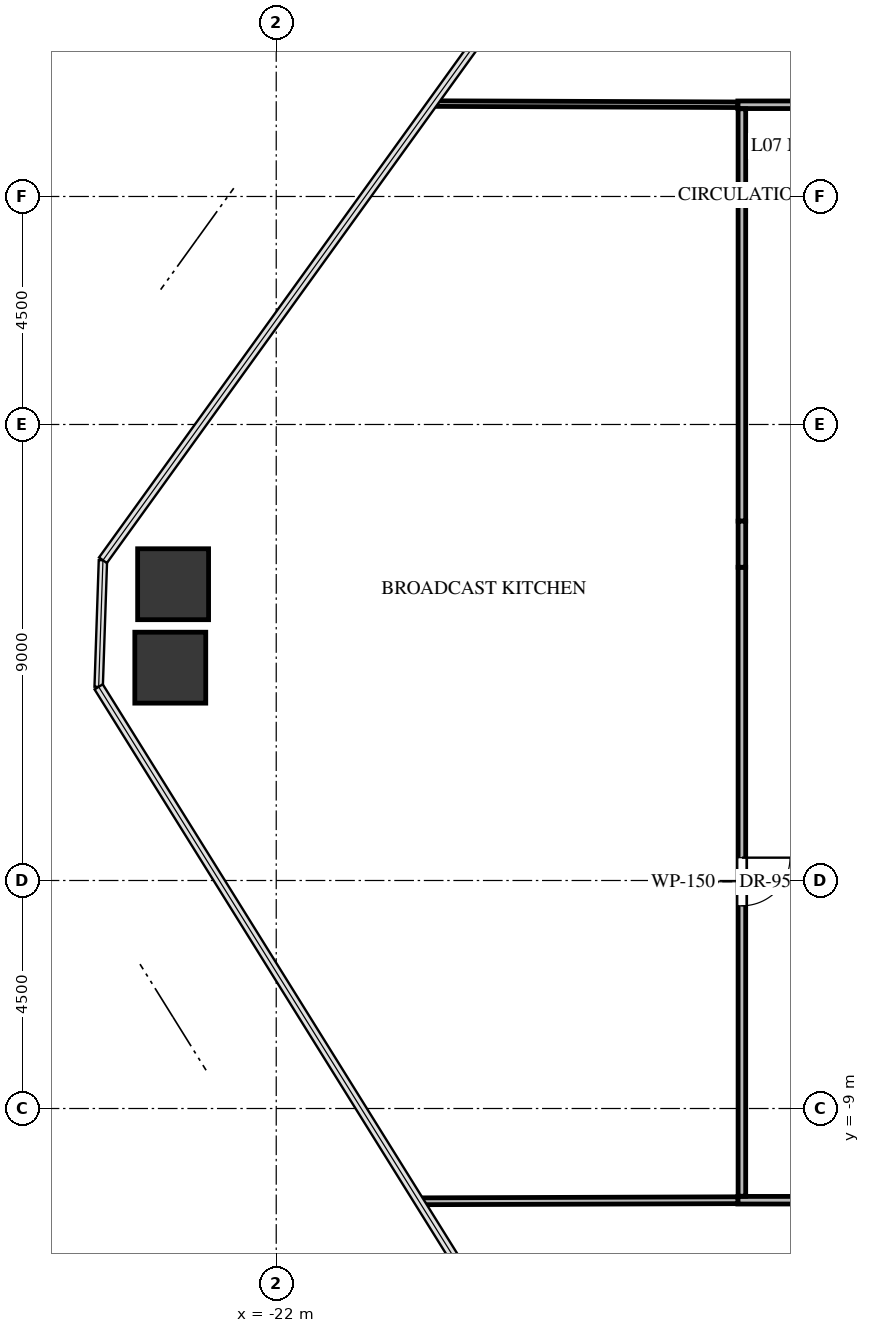
"""IFC4 building model, lengths in metres.
Left out: names, types, materials, properties, quantities, classifications, styles, units other than length and angle.
Written with IfcOpenShell. Run it as: python <this file> out.ifc"""

import sys

from ifc_helpers import new_model, si_unit, direction, frame, frame_2d, origin, origin_2d, place, context, subcontext, project, spatial, rectangle, extrude, source, transform, mapped, element, fill, save


model = new_model("IFC4")
c1 = context("Model", 3, precision=1e-05, world=origin(), true_north=direction((0.0, 1.0)))
c2 = subcontext(c1, "Body", "Model", "MODEL_VIEW")
j1 = project(units=[si_unit("LENGTHUNIT", "METRE"), si_unit("PLANEANGLEUNIT", "RADIAN")], contexts=[c1])
p1 = place(None, origin())
s1 = spatial("IfcSite", under=j1, at=p1, CompositionType="ELEMENT")
p2 = place(p1, origin())
s2 = spatial("IfcBuilding", under=s1, at=p2, CompositionType="ELEMENT")
p3 = place(p2, frame((0.0, 0.0, 35.7)))
s3 = spatial("IfcBuildingStorey", under=s2, at=p3, CompositionType="ELEMENT", Elevation=35.7)
m1 = source(origin(), c2, "Body", "SweptSolid", [
    extrude(rectangle(XDim=1.4, YDim=1.4, at=origin_2d()), origin(), (0.0, 0.0, 1.0), 3.3),
])
for number, where, z_axis, x_axis in (
    (1, (-24.091, -0.3, -0.24), (0.0, 0.0, 1.0), (1.0, 0.0, 0.0)),
    (2, (-24.035, 1.347, -0.24), (0.0, 0.0, 1.0), (1.0, 0.0, 0.0)),
):
    element("IfcColumn", number, at=place(p3, frame(where, z_axis=z_axis, x_axis=x_axis)), inside=s3, PredefinedType="COLUMN", context=c2, shape_type="MappedRepresentation", body=[
        mapped(m1, transform((0.0, 0.0, 0.0), x_axis=(1.0, 0.0, 0.0), y_axis=(0.0, 1.0, 0.0), z_axis=(0.0, 0.0, 1.0), scale=1.0)),
    ])
p4 = place(p3, frame((-10.72, 10.81, 0.0), z_axis=(0.0, 0.0, 1.0), x_axis=(-1.0, 0.0, 0.0)))
e3 = element("IfcWall", 3, at=p4, inside=s3, PredefinedType="PARTITIONING", context=c2, shape_type="SweptSolid", body=[
    extrude(rectangle(XDim=2.17, YDim=0.15, at=frame_2d((1.085, 0.0))), origin(), (0.0, 0.0, 1.0), 3.045),
])
p5 = place(p3, frame((-12.89, -10.81, 0.0), z_axis=(0.0, 0.0, 1.0), x_axis=(1.0, 0.0, 0.0)))
e4 = element("IfcWall", 4, at=p5, inside=s3, PredefinedType="PARTITIONING", context=c2, shape_type="SweptSolid", body=[
    extrude(rectangle(XDim=6.768, YDim=0.15, at=frame_2d((3.384, 0.0))), origin(), (0.0, 0.0, 1.0), 2.13),
])
p6 = place(p5, frame((2.934, 0.0, 0.0)))
e5 = element("IfcOpeningElement", 5, at=p6, cuts=e4, PredefinedType="OPENING", context=c2, shape_type="SweptSolid", body=[
    extrude(rectangle(XDim=0.9, YDim=2.05, at=frame_2d((0.45, 1.025))), frame((0.0, 0.085, 0.0), z_axis=(0.0, -1.0, 0.0), x_axis=(1.0, 0.0, 0.0)), (0.0, 0.0, 1.0), 0.17),
])
p7 = place(p3, frame((-12.81, 10.731, 0.0), z_axis=(0.0, 0.0, 1.0), x_axis=(0.0, -1.0, 0.0)))
e6 = element("IfcWall", 6, at=p7, inside=s3, PredefinedType="PARTITIONING", context=c2, shape_type="SweptSolid", body=[
    extrude(rectangle(XDim=8.139, YDim=0.15, at=frame_2d((4.069, 0.0))), origin(), (0.0, 0.0, 1.0), 3.045),
])
p8 = place(p3, frame((-12.81, 1.682, 0.0), z_axis=(0.0, 0.0, 1.0), x_axis=(0.0, -1.0, 0.0)))
e7 = element("IfcWall", 7, at=p8, inside=s3, PredefinedType="PARTITIONING", context=c2, shape_type="SweptSolid", body=[
    extrude(rectangle(XDim=12.413, YDim=0.15, at=frame_2d((6.207, 0.0))), origin(), (0.0, 0.0, 1.0), 3.045),
])
p9 = place(p8, frame((5.732, 0.0, 0.0)))
e8 = element("IfcOpeningElement", 8, at=p9, cuts=e7, PredefinedType="OPENING", context=c2, shape_type="SweptSolid", body=[
    extrude(rectangle(XDim=0.95, YDim=2.1, at=frame_2d((0.475, 1.05))), frame((0.0, 0.085, 0.0), z_axis=(0.0, -1.0, 0.0), x_axis=(1.0, 0.0, 0.0)), (0.0, 0.0, 1.0), 0.17),
])
p10 = place(p3, frame((-12.81, 2.592, 0.0), z_axis=(0.0, 0.0, 1.0), x_axis=(0.0, -1.0, 0.0)))
e9 = element("IfcWall", 9, at=p10, inside=s3, PredefinedType="PARTITIONING", context=c2, shape_type="SweptSolid", body=[
    extrude(rectangle(XDim=0.91, YDim=0.15, at=frame_2d((0.455, 0.0))), origin(), (0.0, 0.0, 1.0), 2.13),
])
p11 = place(p3, frame((-12.89, 10.81, 0.0), z_axis=(0.0, 0.0, 1.0), x_axis=(-0.999992607823, 0.003845035728, 0.0)))
e10 = element("IfcWall", 10, at=p11, inside=s3, PredefinedType="MOVABLE", context=c2, shape_type="SweptSolid", body=[
    extrude(rectangle(XDim=6.032, YDim=0.11, at=frame_2d((3.016, 0.0))), origin(), (0.0, 0.0, 1.0), 2.38),
])
p12 = place(p3, frame((-19.182, -10.831, 0.0), z_axis=(0.0, 0.0, 1.0), x_axis=(0.999994432845, 0.003336806783, 0.0)))
e11 = element("IfcWall", 11, at=p12, inside=s3, PredefinedType="PARTITIONING", context=c2, shape_type="SweptSolid", body=[
    extrude(rectangle(XDim=6.292, YDim=0.135, at=frame_2d((3.146, 0.0))), origin(), (0.0, 0.0, 1.0), 2.38),
])
m2 = source(origin(), c2, "Body", "SweptSolid", [
    extrude(rectangle(XDim=0.95, YDim=2.1, at=frame_2d((0.475, 1.05))), frame((0.0, 0.025, 0.0), z_axis=(0.0, -1.0, 0.0), x_axis=(1.0, 0.0, 0.0)), (0.0, 0.0, 1.0), 0.05),
])
p13 = place(p9, origin())
e12 = element("IfcDoor", 12, at=p13, inside=s3, OperationType="SINGLE_SWING_LEFT", PredefinedType="DOOR", context=c2, shape_type="MappedRepresentation", body=[
    mapped(m2, transform((0.0, 0.0, 0.0), x_axis=(1.0, 0.0, 0.0), y_axis=(0.0, 1.0, 0.0), z_axis=(0.0, 0.0, 1.0), scale=1.0)),
])
fill(e8, e12)
save(model, sys.argv[1])
